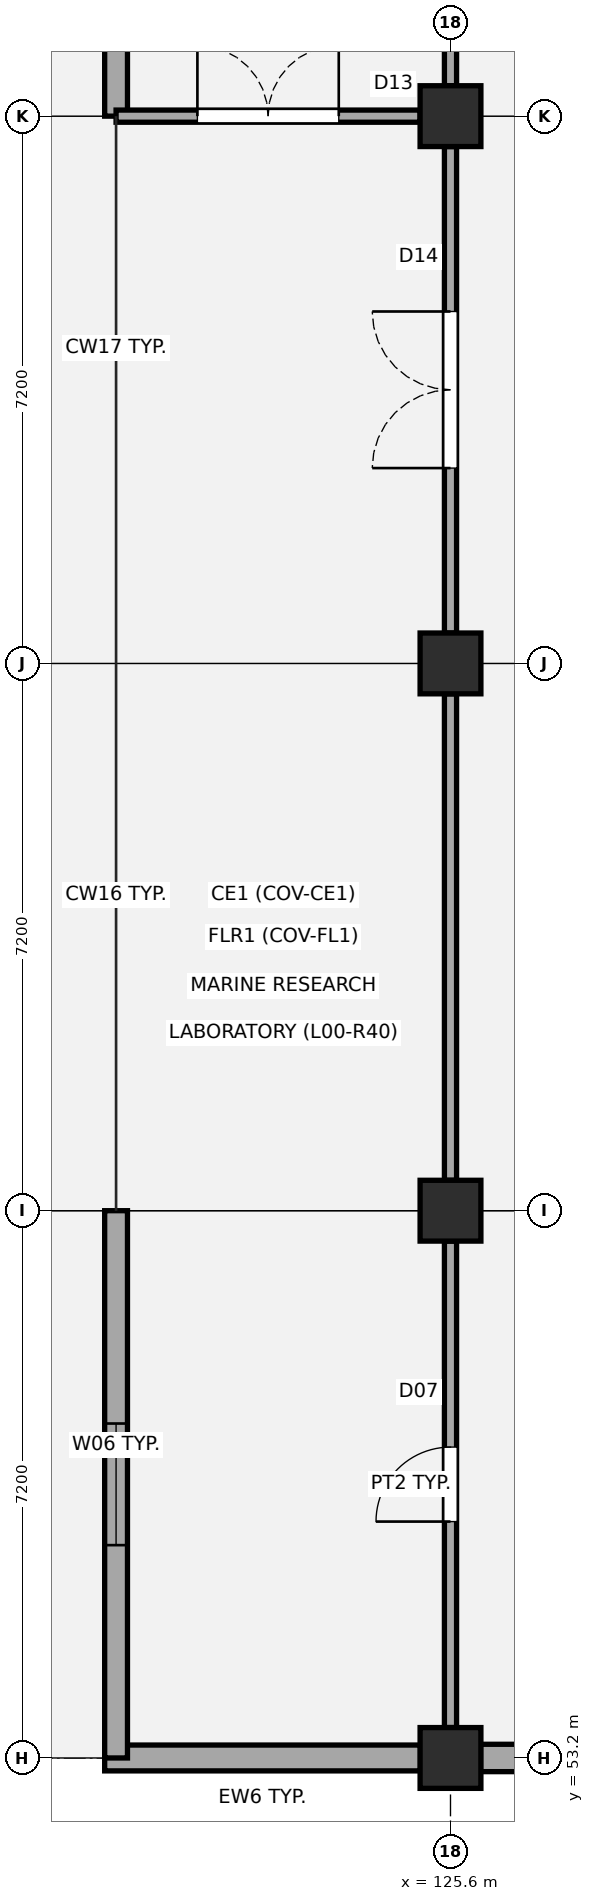
"""IFC4 building model, lengths in metres.
Left out: names, types, materials, properties, quantities, classifications, styles, units other than length and angle.
Written with IfcOpenShell. Run it as: python <this file> out.ifc"""

import sys

from ifc_helpers import new_model, si_unit, direction, frame, frame_2d, origin, origin_2d, place, context, subcontext, project, spatial, rectangle, extrude, element, fill, save


model = new_model("IFC4")
c1 = context("Model", 3, precision=1e-05, world=origin(), true_north=direction((0.0, 1.0)))
c2 = subcontext(c1, "Body", "Model", "MODEL_VIEW")
j1 = project(units=[si_unit("LENGTHUNIT", "METRE"), si_unit("PLANEANGLEUNIT", "RADIAN")], contexts=[c1])
p1 = place(None, origin())
s1 = spatial("IfcSite", under=j1, at=p1, CompositionType="ELEMENT")
p2 = place(p1, origin())
s2 = spatial("IfcBuilding", under=s1, at=p2, CompositionType="ELEMENT")
p3 = place(p2, origin())
s3 = spatial("IfcBuildingStorey", under=s2, at=p3, CompositionType="ELEMENT", Elevation=0.0)
for number, where, z_axis, x_axis in (
    (1, (125.6, 53.2, -0.35), (0.0, 0.0, 1.0), (1.0, 0.0, 0.0)),
    (2, (125.6, 60.4, -0.35), (0.0, 0.0, 1.0), (1.0, 0.0, 0.0)),
    (3, (125.6, 67.6, -0.35), (0.0, 0.0, 1.0), (1.0, 0.0, 0.0)),
    (4, (125.6, 74.8, -0.35), (0.0, 0.0, 1.0), (1.0, 0.0, 0.0)),
):
    element("IfcColumn", number, at=place(p3, frame(where, z_axis=z_axis, x_axis=x_axis)), inside=s3, PredefinedType="COLUMN", context=c2, shape_type="SweptSolid", body=[
        extrude(rectangle(XDim=0.8, YDim=0.8, at=origin_2d()), origin(), (0.0, 0.0, 1.0), 5.03),
    ])
p4 = place(p3, frame((125.205, 53.2, 0.0), z_axis=(0.0, 0.0, 1.0), x_axis=(-1.0, 0.0, 0.0)))
e5 = element("IfcWall", 5, at=p4, inside=s3, PredefinedType="STANDARD", context=c2, shape_type="SweptSolid", body=[
    extrude(rectangle(XDim=4.155, YDim=0.34, at=frame_2d((2.078, 0.0))), origin(), (0.0, 0.0, 1.0), 3.67),
])
p5 = place(p3, frame((132.405, 53.2, 0.0), z_axis=(0.0, 0.0, 1.0), x_axis=(-1.0, 0.0, 0.0)))
e6 = element("IfcWall", 6, at=p5, inside=s3, PredefinedType="STANDARD", context=c2, shape_type="SweptSolid", body=[
    extrude(rectangle(XDim=6.41, YDim=0.36, at=frame_2d((3.205, 0.0))), origin(), (0.0, 0.0, 1.0), 3.67),
])
p6 = place(p5, frame((2.005, 0.0, 0.95)))
e7 = element("IfcOpeningElement", 7, at=p6, cuts=e6, PredefinedType="OPENING", context=c2, shape_type="SweptSolid", body=[
    extrude(rectangle(XDim=2.4, YDim=1.55, at=frame_2d((1.2, 0.775))), frame((0.0, 0.19, 0.0), z_axis=(0.0, -1.0, 0.0), x_axis=(1.0, 0.0, 0.0)), (0.0, 0.0, 1.0), 0.38),
])
p7 = place(p3, frame((121.2, 53.2, 0.0), z_axis=(0.0, 0.0, 1.0), x_axis=(0.0, 1.0, 0.0)))
e8 = element("IfcWall", 8, at=p7, inside=s3, PredefinedType="STANDARD", context=c2, shape_type="SweptSolid", body=[
    extrude(rectangle(XDim=7.2, YDim=0.3, at=frame_2d((3.6, 0.0))), origin(), (0.0, 0.0, 1.0), 4.37),
])
p8 = place(p7, frame((2.8, 0.0, 0.95)))
e9 = element("IfcOpeningElement", 9, at=p8, cuts=e8, PredefinedType="OPENING", context=c2, shape_type="SweptSolid", body=[
    extrude(rectangle(XDim=1.6, YDim=1.7, at=frame_2d((0.8, 0.85))), frame((0.0, 0.16, 0.0), z_axis=(0.0, -1.0, 0.0), x_axis=(1.0, 0.0, 0.0)), (0.0, 0.0, 1.0), 0.32),
])
p9 = place(p3, frame((121.2, 74.8, 0.0), z_axis=(0.0, 0.0, 1.0), x_axis=(0.0, 1.0, 0.0)))
e10 = element("IfcWall", 10, at=p9, inside=s3, PredefinedType="STANDARD", context=c2, shape_type="SweptSolid", body=[
    extrude(rectangle(XDim=7.2, YDim=0.3, at=frame_2d((3.6, 0.0))), origin(), (0.0, 0.0, 1.0), 4.37),
])
p10 = place(p9, frame((2.43, 0.0, 0.0)))
e11 = element("IfcOpeningElement", 11, at=p10, cuts=e10, PredefinedType="OPENING", context=c2, shape_type="SweptSolid", body=[
    extrude(rectangle(XDim=2.34, YDim=2.42, at=frame_2d((1.17, 1.21))), frame((0.0, 0.16, 0.0), z_axis=(0.0, -1.0, 0.0), x_axis=(1.0, 0.0, 0.0)), (0.0, 0.0, 1.0), 0.32),
])
p11 = place(p3, frame((125.6, 53.6, 0.0), z_axis=(0.0, 0.0, 1.0), x_axis=(0.0, 1.0, 0.0)))
e12 = element("IfcWall", 12, at=p11, inside=s3, PredefinedType="PARTITIONING", context=c2, shape_type="SweptSolid", body=[
    extrude(rectangle(XDim=6.4, YDim=0.16, at=frame_2d((3.2, 0.0))), origin(), (0.0, 0.0, 1.0), 3.62),
])
p12 = place(p11, frame((2.71, 0.0, 0.0)))
e13 = element("IfcOpeningElement", 13, at=p12, cuts=e12, PredefinedType="OPENING", context=c2, shape_type="SweptSolid", body=[
    extrude(rectangle(XDim=0.98, YDim=2.12, at=frame_2d((0.49, 1.06))), frame((0.0, 0.09, 0.0), z_axis=(0.0, -1.0, 0.0), x_axis=(1.0, 0.0, 0.0)), (0.0, 0.0, 1.0), 0.18),
])
p13 = place(p3, frame((125.6, 60.8, 0.0), z_axis=(0.0, 0.0, 1.0), x_axis=(0.0, 1.0, 0.0)))
e14 = element("IfcWall", 14, at=p13, inside=s3, PredefinedType="PARTITIONING", context=c2, shape_type="SweptSolid", body=[
    extrude(rectangle(XDim=6.4, YDim=0.16, at=frame_2d((3.2, 0.0))), origin(), (0.0, 0.0, 1.0), 3.62),
])
p14 = place(p3, frame((125.6, 68.0, 0.0), z_axis=(0.0, 0.0, 1.0), x_axis=(0.0, 1.0, 0.0)))
e15 = element("IfcWall", 15, at=p14, inside=s3, PredefinedType="PARTITIONING", context=c2, shape_type="SweptSolid", body=[
    extrude(rectangle(XDim=6.4, YDim=0.16, at=frame_2d((3.2, 0.0))), origin(), (0.0, 0.0, 1.0), 3.62),
])
p15 = place(p14, frame((2.17, 0.0, 0.0)))
e16 = element("IfcOpeningElement", 16, at=p15, cuts=e15, PredefinedType="OPENING", context=c2, shape_type="SweptSolid", body=[
    extrude(rectangle(XDim=2.06, YDim=2.28, at=frame_2d((1.03, 1.14))), frame((0.0, 0.09, 0.0), z_axis=(0.0, -1.0, 0.0), x_axis=(1.0, 0.0, 0.0)), (0.0, 0.0, 1.0), 0.18),
])
p16 = place(p3, frame((121.2, 74.8, 0.0), z_axis=(0.0, 0.0, 1.0), x_axis=(1.0, 0.0, 0.0)))
e17 = element("IfcWall", 17, at=p16, inside=s3, PredefinedType="PARTITIONING", context=c2, shape_type="SweptSolid", body=[
    extrude(rectangle(XDim=4.0, YDim=0.16, at=frame_2d((2.0, 0.0))), origin(), (0.0, 0.0, 1.0), 3.52),
])
p17 = place(p16, frame((1.07, 0.0, 0.0)))
e18 = element("IfcOpeningElement", 18, at=p17, cuts=e17, PredefinedType="OPENING", context=c2, shape_type="SweptSolid", body=[
    extrude(rectangle(XDim=1.86, YDim=2.26, at=frame_2d((0.93, 1.13))), frame((0.0, 0.09, 0.0), z_axis=(0.0, -1.0, 0.0), x_axis=(1.0, 0.0, 0.0)), (0.0, 0.0, 1.0), 0.18),
])
p18 = place(p3, frame((125.6, 75.2, 0.0), z_axis=(0.0, 0.0, 1.0), x_axis=(0.0, 1.0, 0.0)))
e19 = element("IfcWall", 19, at=p18, inside=s3, PredefinedType="PARTITIONING", context=c2, shape_type="SweptSolid", body=[
    extrude(rectangle(XDim=6.4, YDim=0.16, at=frame_2d((3.2, 0.0))), origin(), (0.0, 0.0, 1.0), 3.62),
])
p19 = place(p18, frame((2.71, 0.0, 0.0)))
e20 = element("IfcOpeningElement", 20, at=p19, cuts=e19, PredefinedType="OPENING", context=c2, shape_type="SweptSolid", body=[
    extrude(rectangle(XDim=0.98, YDim=2.12, at=frame_2d((0.49, 1.06))), frame((0.0, 0.09, 0.0), z_axis=(0.0, -1.0, 0.0), x_axis=(1.0, 0.0, 0.0)), (0.0, 0.0, 1.0), 0.18),
])
p20 = place(p8, origin())
e21 = element("IfcWindow", 21, at=p20, inside=s3, PartitioningType="SINGLE_PANEL", PredefinedType="WINDOW", context=c2, shape_type="SweptSolid", body=[
    extrude(rectangle(XDim=1.6, YDim=1.7, at=frame_2d((0.8, 0.85))), frame((0.0, 0.03, 0.0), z_axis=(0.0, -1.0, 0.0), x_axis=(1.0, 0.0, 0.0)), (0.0, 0.0, 1.0), 0.06),
])
fill(e9, e21)
p21 = place(p17, origin())
e22 = element("IfcDoor", 22, at=p21, inside=s3, OperationType="DOUBLE_DOOR_SINGLE_SWING", PredefinedType="DOOR", context=c2, shape_type="SweptSolid", body=[
    extrude(rectangle(XDim=1.86, YDim=2.26, at=frame_2d((0.93, 1.13))), frame((0.0, 0.025, 0.0), z_axis=(0.0, -1.0, 0.0), x_axis=(1.0, 0.0, 0.0)), (0.0, 0.0, 1.0), 0.05),
])
fill(e18, e22)
p22 = place(p12, origin())
e23 = element("IfcDoor", 23, at=p22, inside=s3, OperationType="SINGLE_SWING_LEFT", PredefinedType="DOOR", context=c2, shape_type="SweptSolid", body=[
    extrude(rectangle(XDim=0.98, YDim=2.12, at=frame_2d((0.49, 1.06))), frame((0.0, 0.025, 0.0), z_axis=(0.0, -1.0, 0.0), x_axis=(1.0, 0.0, 0.0)), (0.0, 0.0, 1.0), 0.05),
])
fill(e13, e23)
p23 = place(p15, origin())
e24 = element("IfcDoor", 24, at=p23, inside=s3, OperationType="DOUBLE_DOOR_SINGLE_SWING", PredefinedType="DOOR", context=c2, shape_type="SweptSolid", body=[
    extrude(rectangle(XDim=2.06, YDim=2.28, at=frame_2d((1.03, 1.14))), frame((0.0, 0.025, 0.0), z_axis=(0.0, -1.0, 0.0), x_axis=(1.0, 0.0, 0.0)), (0.0, 0.0, 1.0), 0.05),
])
fill(e16, e24)
save(model, sys.argv[1])
